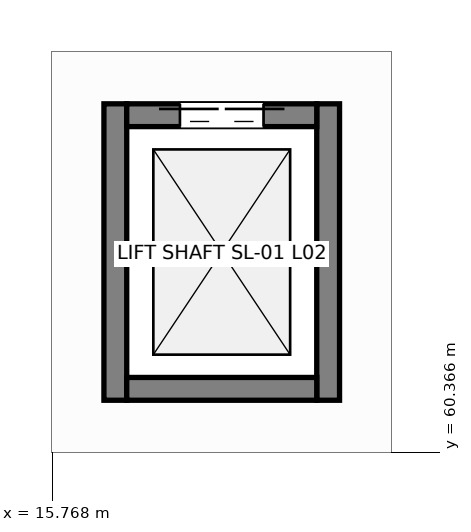
"""IFC4 building model, lengths in metres.
Left out: names, types, materials, properties, quantities, classifications, styles, units other than length and angle.
Written with IfcOpenShell. Run it as: python <this file> out.ifc"""

import sys

from ifc_helpers import new_model, si_unit, direction, frame, frame_2d, origin, place, context, subcontext, project, spatial, rectangle, extrude, element, fill, save


model = new_model("IFC4")
c1 = context("Model", 3, precision=1e-05, world=origin(), true_north=direction((0.0, 1.0)))
c2 = subcontext(c1, "Body", "Model", "MODEL_VIEW")
j1 = project(units=[si_unit("LENGTHUNIT", "METRE"), si_unit("PLANEANGLEUNIT", "RADIAN")], contexts=[c1])
p1 = place(None, origin())
s1 = spatial("IfcSite", under=j1, at=p1, CompositionType="ELEMENT")
p2 = place(p1, origin())
s2 = spatial("IfcBuilding", under=s1, at=p2, CompositionType="ELEMENT")
p3 = place(p2, frame((0.0, 0.0, 9.0)))
s3 = spatial("IfcBuildingStorey", under=s2, at=p3, CompositionType="ELEMENT", Elevation=9.0)
for number, where, z_axis, x_axis in (
    (1, (16.6, 61.05, 0.0), (0.0, 0.0, 1.0), (0.0, 1.0, 0.0)),
    (2, (19.4, 61.05, 0.0), (0.0, 0.0, 1.0), (0.0, 1.0, 0.0)),
):
    element("IfcWall", number, at=place(p3, frame(where, z_axis=z_axis, x_axis=x_axis)), inside=s3, PredefinedType="SHEAR", context=c2, shape_type="SweptSolid", body=[
        extrude(rectangle(XDim=3.9, YDim=0.3, at=frame_2d((1.95, 0.0))), origin(), (0.0, 0.0, 1.0), 3.99),
    ])
p4 = place(p3, frame((16.75, 64.8, 0.0), z_axis=(0.0, 0.0, 1.0), x_axis=(1.0, 0.0, 0.0)))
e3 = element("IfcWall", 3, at=p4, inside=s3, PredefinedType="SHEAR", context=c2, shape_type="SweptSolid", body=[
    extrude(rectangle(XDim=2.5, YDim=0.3, at=frame_2d((1.25, 0.0))), origin(), (0.0, 0.0, 1.0), 3.99),
])
p5 = place(p4, frame((0.7, 0.0, 0.0)))
e4 = element("IfcOpeningElement", 4, at=p5, cuts=e3, PredefinedType="OPENING", context=c2, shape_type="SweptSolid", body=[
    extrude(rectangle(XDim=1.1, YDim=2.15, at=frame_2d((0.55, 1.075))), frame((0.0, 0.16, 0.0), z_axis=(0.0, -1.0, 0.0), x_axis=(1.0, 0.0, 0.0)), (0.0, 0.0, 1.0), 0.32),
])
p6 = place(p3, frame((16.75, 61.2, 0.0), z_axis=(0.0, 0.0, 1.0), x_axis=(1.0, 0.0, 0.0)))
e5 = element("IfcWall", 5, at=p6, inside=s3, PredefinedType="SHEAR", context=c2, shape_type="SweptSolid", body=[
    extrude(rectangle(XDim=2.5, YDim=0.3, at=frame_2d((1.25, 0.0))), origin(), (0.0, 0.0, 1.0), 3.99),
])
p7 = place(p5, origin())
e6 = element("IfcDoor", 6, at=p7, inside=s3, OperationType="DOUBLE_DOOR_SLIDING", PredefinedType="DOOR", context=c2, shape_type="SweptSolid", body=[
    extrude(rectangle(XDim=1.1, YDim=2.15, at=frame_2d((0.55, 1.075))), frame((0.0, 0.025, 0.0), z_axis=(0.0, -1.0, 0.0), x_axis=(1.0, 0.0, 0.0)), (0.0, 0.0, 1.0), 0.05),
])
fill(e4, e6)
save(model, sys.argv[1])
